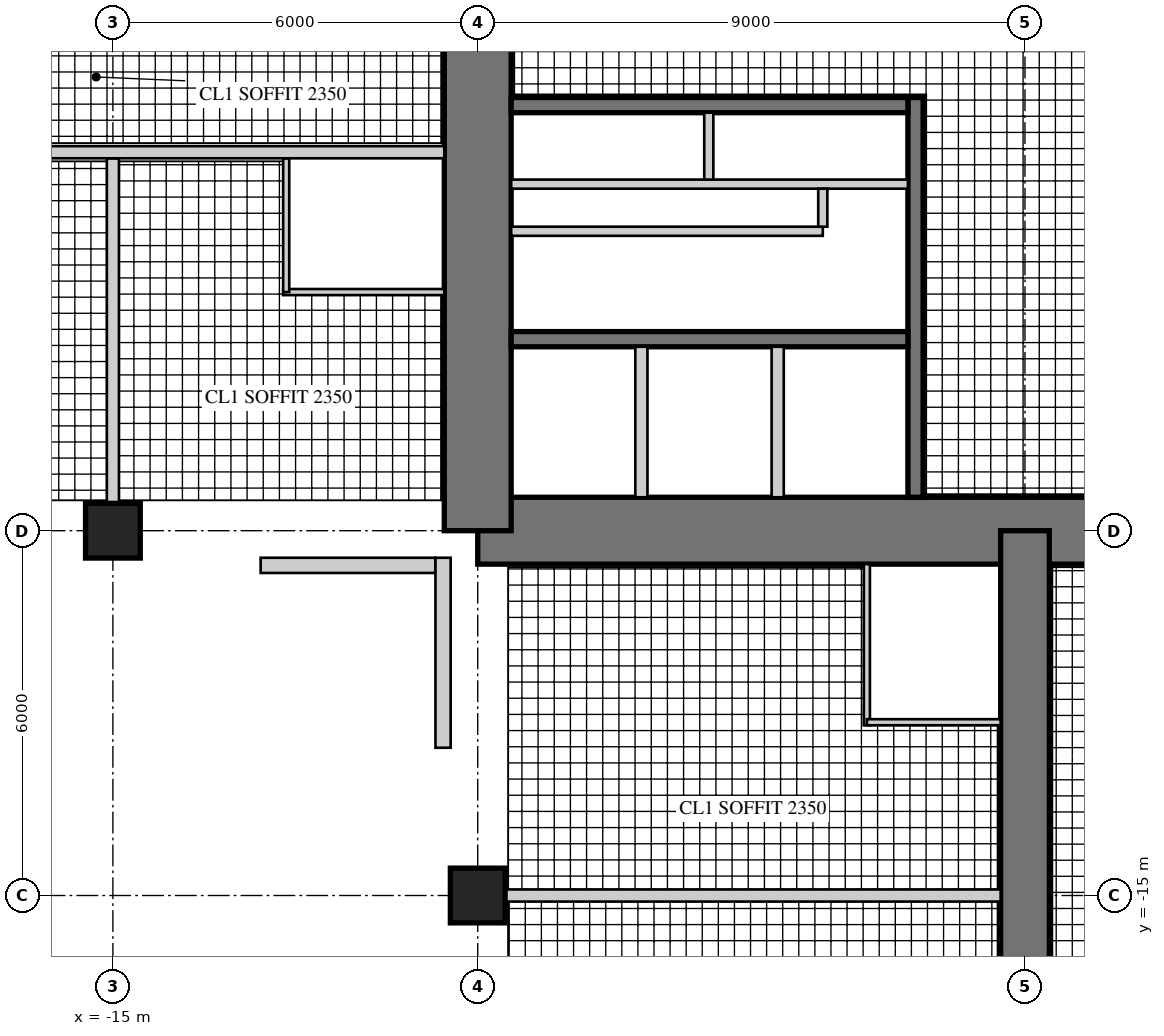
"""IFC4 building model, lengths in metres.
Left out: names, types, materials, properties, quantities, classifications, styles, units other than length and angle.
Written with IfcOpenShell. Run it as: python <this file> out.ifc"""

import sys

from ifc_helpers import new_model, si_unit, direction, frame, frame_2d, origin, origin_2d, place, context, subcontext, project, spatial, rectangle, hollow_rectangle, extrude, element, fill, save


model = new_model("IFC4")
c1 = context("Model", 3, precision=1e-05, world=origin(), true_north=direction((0.0, 1.0)))
c2 = subcontext(c1, "Body", "Model", "MODEL_VIEW")
j1 = project(units=[si_unit("LENGTHUNIT", "METRE"), si_unit("PLANEANGLEUNIT", "RADIAN")], contexts=[c1])
p1 = place(None, origin())
s1 = spatial("IfcSite", under=j1, at=p1, CompositionType="ELEMENT")
p2 = place(p1, origin())
s2 = spatial("IfcBuilding", under=s1, at=p2, CompositionType="ELEMENT")
p3 = place(p2, frame((0.0, 0.0, 189.9)))
s3 = spatial("IfcBuildingStorey", under=s2, at=p3, CompositionType="ELEMENT", Elevation=189.9)
p4 = place(p3, frame((-9.0, -9.0, 0.0), z_axis=(0.0, 0.0, 1.0), x_axis=(1.0, 0.0, 0.0)))
e1 = element("IfcWall", 1, at=p4, inside=s3, PredefinedType="SHEAR", context=c2, shape_type="SweptSolid", body=[
    extrude(rectangle(XDim=18.0, YDim=1.1, at=frame_2d((9.0, 0.0))), origin(), (0.0, 0.0, 1.0), 3.4),
])
p5 = place(p4, frame((9.8, 0.0, 0.0)))
e2 = element("IfcOpeningElement", 2, at=p5, cuts=e1, PredefinedType="OPENING", context=c2, shape_type="SweptSolid", body=[
    extrude(rectangle(XDim=1.0, YDim=2.4, at=frame_2d((0.5, 1.2))), frame((0.0, 0.56, 0.0), z_axis=(0.0, -1.0, 0.0), x_axis=(1.0, 0.0, 0.0)), (0.0, 0.0, 1.0), 1.12),
])
p6 = place(p3, frame((-9.0, 9.0, 0.0), z_axis=(0.0, 0.0, 1.0), x_axis=(0.0, -1.0, 0.0)))
e3 = element("IfcWall", 3, at=p6, inside=s3, PredefinedType="SHEAR", context=c2, shape_type="SweptSolid", body=[
    extrude(rectangle(XDim=18.0, YDim=1.1, at=frame_2d((9.0, 0.0))), origin(), (0.0, 0.0, 1.0), 3.4),
])
p7 = place(p6, frame((9.8, 0.0, 0.0)))
e4 = element("IfcOpeningElement", 4, at=p7, cuts=e3, PredefinedType="OPENING", context=c2, shape_type="SweptSolid", body=[
    extrude(rectangle(XDim=1.0, YDim=2.4, at=frame_2d((0.5, 1.2))), frame((0.0, 0.56, 0.0), z_axis=(0.0, -1.0, 0.0), x_axis=(1.0, 0.0, 0.0)), (0.0, 0.0, 1.0), 1.12),
])
p8 = place(p3, frame((-1.8, -1.875, 0.0), z_axis=(0.0, 0.0, 1.0), x_axis=(0.0, -1.0, 0.0)))
e5 = element("IfcWall", 5, at=p8, inside=s3, PredefinedType="SHEAR", context=c2, shape_type="SweptSolid", body=[
    extrude(rectangle(XDim=6.575, YDim=0.25, at=frame_2d((3.288, 0.0))), origin(), (0.0, 0.0, 1.0), 3.4),
])
p9 = place(p8, frame((1.875, 0.0, 0.0)))
e6 = element("IfcOpeningElement", 6, at=p9, cuts=e5, PredefinedType="OPENING", context=c2, shape_type="SweptSolid", body=[
    extrude(rectangle(XDim=1.6, YDim=2.4, at=frame_2d((0.8, 1.2))), frame((0.0, 0.135, 0.0), z_axis=(0.0, -1.0, 0.0), x_axis=(1.0, 0.0, 0.0)), (0.0, 0.0, 1.0), 0.27),
])
p10 = place(p3, frame((-1.925, -2.0, 0.0), z_axis=(0.0, 0.0, 1.0), x_axis=(-1.0, 0.0, 0.0)))
e7 = element("IfcWall", 7, at=p10, inside=s3, PredefinedType="SHEAR", context=c2, shape_type="SweptSolid", body=[
    extrude(rectangle(XDim=6.525, YDim=0.25, at=frame_2d((3.262, 0.0))), origin(), (0.0, 0.0, 1.0), 3.4),
])
p11 = place(p3, frame((-1.925, -5.85, 0.0), z_axis=(0.0, 0.0, 1.0), x_axis=(-1.0, 0.0, 0.0)))
e8 = element("IfcWall", 8, at=p11, inside=s3, PredefinedType="SHEAR", context=c2, shape_type="SweptSolid", body=[
    extrude(rectangle(XDim=6.525, YDim=0.25, at=frame_2d((3.262, 0.0))), origin(), (0.0, 0.0, 1.0), 3.4),
])
p12 = place(p11, frame((0.471, 0.0, 0.0)))
e9 = element("IfcOpeningElement", 9, at=p12, cuts=e8, PredefinedType="OPENING", context=c2, shape_type="SweptSolid", body=[
    extrude(rectangle(XDim=1.1, YDim=2.2, at=frame_2d((0.55, 1.1))), frame((0.0, 0.135, 0.0), z_axis=(0.0, -1.0, 0.0), x_axis=(1.0, 0.0, 0.0)), (0.0, 0.0, 1.0), 0.27),
])
p13 = place(p11, frame((2.712, 0.0, 0.0)))
e10 = element("IfcOpeningElement", 10, at=p13, cuts=e8, PredefinedType="OPENING", context=c2, shape_type="SweptSolid", body=[
    extrude(rectangle(XDim=1.1, YDim=2.2, at=frame_2d((0.55, 1.1))), frame((0.0, 0.135, 0.0), z_axis=(0.0, -1.0, 0.0), x_axis=(1.0, 0.0, 0.0)), (0.0, 0.0, 1.0), 0.27),
])
p14 = place(p11, frame((4.954, 0.0, 0.0)))
e11 = element("IfcOpeningElement", 11, at=p14, cuts=e8, PredefinedType="OPENING", context=c2, shape_type="SweptSolid", body=[
    extrude(rectangle(XDim=1.1, YDim=2.2, at=frame_2d((0.55, 1.1))), frame((0.0, 0.135, 0.0), z_axis=(0.0, -1.0, 0.0), x_axis=(1.0, 0.0, 0.0)), (0.0, 0.0, 1.0), 0.27),
])
p15 = place(p3, frame((-1.925, -3.3, 0.0), z_axis=(0.0, 0.0, 1.0), x_axis=(-1.0, 0.0, 0.0)))
e12 = element("IfcWall", 12, at=p15, inside=s3, PredefinedType="PARTITIONING", context=c2, shape_type="SweptSolid", body=[
    extrude(rectangle(XDim=6.525, YDim=0.15, at=frame_2d((3.262, 0.0))), origin(), (0.0, 0.0, 1.0), 3.4),
])
p16 = place(p15, frame((0.075, 0.0, 0.0)))
e13 = element("IfcOpeningElement", 13, at=p16, cuts=e12, PredefinedType="OPENING", context=c2, shape_type="SweptSolid", body=[
    extrude(rectangle(XDim=0.8, YDim=2.1, at=frame_2d((0.4, 1.05))), frame((0.0, 0.085, 0.0), z_axis=(0.0, -1.0, 0.0), x_axis=(1.0, 0.0, 0.0)), (0.0, 0.0, 1.0), 0.17),
])
p17 = place(p15, frame((3.675, 0.0, 0.0)))
e14 = element("IfcOpeningElement", 14, at=p17, cuts=e12, PredefinedType="OPENING", context=c2, shape_type="SweptSolid", body=[
    extrude(rectangle(XDim=0.8, YDim=2.1, at=frame_2d((0.4, 1.05))), frame((0.0, 0.085, 0.0), z_axis=(0.0, -1.0, 0.0), x_axis=(1.0, 0.0, 0.0)), (0.0, 0.0, 1.0), 0.17),
])
p18 = place(p3, frame((-5.2, -2.125, 0.0), z_axis=(0.0, 0.0, 1.0), x_axis=(0.0, -1.0, 0.0)))
e15 = element("IfcWall", 15, at=p18, inside=s3, PredefinedType="PARTITIONING", context=c2, shape_type="SweptSolid", body=[
    extrude(rectangle(XDim=1.1, YDim=0.15, at=frame_2d((0.55, 0.0))), origin(), (0.0, 0.0, 1.0), 3.4),
])
for number, where, z_axis, x_axis in (
    (16, (-4.067, -5.975, 0.0), (0.0, 0.0, 1.0), (0.0, -1.0, 0.0)),
    (17, (-6.308, -5.975, 0.0), (0.0, 0.0, 1.0), (0.0, -1.0, 0.0)),
):
    element("IfcWall", number, at=place(p3, frame(where, z_axis=z_axis, x_axis=x_axis)), inside=s3, PredefinedType="PARTITIONING", context=c2, shape_type="SweptSolid", body=[
        extrude(rectangle(XDim=2.475, YDim=0.2, at=frame_2d((1.237, 0.0))), origin(), (0.0, 0.0, 1.0), 3.4),
    ])
p19 = place(p3, frame((0.0, -9.0, 0.0), z_axis=(0.0, 0.0, 1.0), x_axis=(0.0, -1.0, 0.0)))
e18 = element("IfcWall", 18, at=p19, inside=s3, PredefinedType="SHEAR", context=c2, shape_type="SweptSolid", body=[
    extrude(rectangle(XDim=18.0, YDim=0.8, at=frame_2d((9.0, 0.0))), origin(), (0.0, 0.0, 1.0), 3.4),
])
p20 = place(p19, frame((3.95, 0.0, 0.0)))
e19 = element("IfcOpeningElement", 19, at=p20, cuts=e18, PredefinedType="OPENING", context=c2, shape_type="SweptSolid", body=[
    extrude(rectangle(XDim=1.0, YDim=2.15, at=frame_2d((0.5, 1.075))), frame((0.0, 0.41, 0.0), z_axis=(0.0, -1.0, 0.0), x_axis=(1.0, 0.0, 0.0)), (0.0, 0.0, 1.0), 0.82),
])
p21 = place(p19, frame((6.6, 0.0, 0.0)))
e20 = element("IfcOpeningElement", 20, at=p21, cuts=e18, PredefinedType="OPENING", context=c2, shape_type="SweptSolid", body=[
    extrude(rectangle(XDim=1.0, YDim=2.15, at=frame_2d((0.5, 1.075))), frame((0.0, 0.41, 0.0), z_axis=(0.0, -1.0, 0.0), x_axis=(1.0, 0.0, 0.0)), (0.0, 0.0, 1.0), 0.82),
])
p22 = place(p19, frame((13.25, 0.0, 0.0)))
e21 = element("IfcOpeningElement", 21, at=p22, cuts=e18, PredefinedType="OPENING", context=c2, shape_type="SweptSolid", body=[
    extrude(rectangle(XDim=1.0, YDim=2.2, at=frame_2d((0.5, 1.1))), frame((0.0, 0.41, 0.0), z_axis=(0.0, -1.0, 0.0), x_axis=(1.0, 0.0, 0.0)), (0.0, 0.0, 1.0), 0.82),
])
for number, where, z_axis, x_axis in (
    (22, (-9.0, -15.0, 0.0), (0.0, 0.0, 1.0), (1.0, 0.0, 0.0)),
    (23, (-15.0, -9.0, 0.0), (0.0, 0.0, 1.0), (1.0, 0.0, 0.0)),
):
    element("IfcColumn", number, at=place(p3, frame(where, z_axis=z_axis, x_axis=x_axis)), inside=s3, PredefinedType="COLUMN", context=c2, shape_type="SweptSolid", body=[
        extrude(rectangle(XDim=0.9, YDim=0.9, at=origin_2d()), origin(), (0.0, 0.0, 1.0), 3.4),
    ])
p23 = place(p3, frame((-12.57, -9.57, 0.0), z_axis=(0.0, 0.0, 1.0), x_axis=(1.0, 0.0, 0.0)))
e24 = element("IfcWall", 24, at=p23, inside=s3, PredefinedType="SOLIDWALL", context=c2, shape_type="SweptSolid", body=[
    extrude(rectangle(XDim=2.875, YDim=0.25, at=frame_2d((1.438, 0.0))), origin(), (0.0, 0.0, 1.0), 3.22),
])
p24 = place(p23, frame((0.6, 0.0, 0.0)))
e25 = element("IfcOpeningElement", 25, at=p24, cuts=e24, PredefinedType="OPENING", context=c2, shape_type="SweptSolid", body=[
    extrude(rectangle(XDim=1.0, YDim=2.2, at=frame_2d((0.5, 1.1))), frame((0.0, 0.135, 0.0), z_axis=(0.0, -1.0, 0.0), x_axis=(1.0, 0.0, 0.0)), (0.0, 0.0, 1.0), 0.27),
])
p25 = place(p3, frame((-9.57, -9.445, 0.0), z_axis=(0.0, 0.0, 1.0), x_axis=(0.0, -1.0, 0.0)))
e26 = element("IfcWall", 26, at=p25, inside=s3, PredefinedType="SOLIDWALL", context=c2, shape_type="SweptSolid", body=[
    extrude(rectangle(XDim=3.125, YDim=0.25, at=frame_2d((1.562, 0.0))), origin(), (0.0, 0.0, 1.0), 3.22),
])
p26 = place(p25, frame((0.6, 0.0, 0.0)))
e27 = element("IfcOpeningElement", 27, at=p26, cuts=e26, PredefinedType="OPENING", context=c2, shape_type="SweptSolid", body=[
    extrude(rectangle(XDim=1.0, YDim=2.2, at=frame_2d((0.5, 1.1))), frame((0.0, 0.135, 0.0), z_axis=(0.0, -1.0, 0.0), x_axis=(1.0, 0.0, 0.0)), (0.0, 0.0, 1.0), 0.27),
])
p27 = place(p3, frame((-3.325, -4.075, 0.0), z_axis=(0.0, 0.0, 1.0), x_axis=(-1.0, 0.0, 0.0)))
e28 = element("IfcWall", 28, at=p27, inside=s3, PredefinedType="PARTITIONING", context=c2, shape_type="SweptSolid", body=[
    extrude(rectangle(XDim=5.125, YDim=0.15, at=frame_2d((2.562, 0.0))), origin(), (0.0, 0.0, 1.0), 3.22),
])
p28 = place(p27, frame((2.062, 0.0, 0.0)))
e29 = element("IfcOpeningElement", 29, at=p28, cuts=e28, PredefinedType="OPENING", context=c2, shape_type="SweptSolid", body=[
    extrude(rectangle(XDim=1.0, YDim=2.1, at=frame_2d((0.5, 1.05))), frame((0.0, 0.085, 0.0), z_axis=(0.0, -1.0, 0.0), x_axis=(1.0, 0.0, 0.0)), (0.0, 0.0, 1.0), 0.17),
])
p29 = place(p3, frame((-3.325, -3.375, 0.0), z_axis=(0.0, 0.0, 1.0), x_axis=(0.0, -1.0, 0.0)))
e30 = element("IfcWall", 30, at=p29, inside=s3, PredefinedType="PARTITIONING", context=c2, shape_type="SweptSolid", body=[
    extrude(rectangle(XDim=0.625, YDim=0.15, at=frame_2d((0.312, 0.0))), origin(), (0.0, 0.0, 1.0), 3.22),
])
p30 = place(p3, frame((-2.6, -9.55, 0.0), z_axis=(0.0, 0.0, 1.0), x_axis=(0.0, -1.0, 0.0)))
e31 = element("IfcWall", 31, at=p30, inside=s3, PredefinedType="PARTITIONING", context=c2, shape_type="SweptSolid", body=[
    extrude(rectangle(XDim=2.65, YDim=0.1, at=frame_2d((1.325, 0.0))), origin(), (0.0, 0.0, 1.0), 3.22),
])
p31 = place(p3, frame((-2.6, -12.15, 0.0), z_axis=(0.0, 0.0, 1.0), x_axis=(1.0, 0.0, 0.0)))
e32 = element("IfcWall", 32, at=p31, inside=s3, PredefinedType="PARTITIONING", context=c2, shape_type="SweptSolid", body=[
    extrude(rectangle(XDim=2.2, YDim=0.1, at=frame_2d((1.1, 0.0))), origin(), (0.0, 0.0, 1.0), 3.22),
])
p32 = place(p31, frame((0.55, 0.0, 0.0)))
e33 = element("IfcOpeningElement", 33, at=p32, cuts=e32, PredefinedType="OPENING", context=c2, shape_type="SweptSolid", body=[
    extrude(rectangle(XDim=0.9, YDim=2.1, at=frame_2d((0.45, 1.05))), frame((0.0, 0.06, 0.0), z_axis=(0.0, -1.0, 0.0), x_axis=(1.0, 0.0, 0.0)), (0.0, 0.0, 1.0), 0.12),
])
p33 = place(p3, frame((-8.55, -15.0, 0.0), z_axis=(0.0, 0.0, 1.0), x_axis=(1.0, 0.0, 0.0)))
e34 = element("IfcWall", 34, at=p33, inside=s3, PredefinedType="SOLIDWALL", context=c2, shape_type="SweptSolid", body=[
    extrude(rectangle(XDim=8.15, YDim=0.2, at=frame_2d((4.075, 0.0))), origin(), (0.0, 0.0, 1.0), 2.47),
])
p34 = place(p3, frame((-9.55, -5.075, 0.0), z_axis=(0.0, 0.0, 1.0), x_axis=(-1.0, 0.0, 0.0)))
e35 = element("IfcWall", 35, at=p34, inside=s3, PredefinedType="PARTITIONING", context=c2, shape_type="SweptSolid", body=[
    extrude(rectangle(XDim=2.65, YDim=0.1, at=frame_2d((1.325, 0.0))), origin(), (0.0, 0.0, 1.0), 3.22),
])
p35 = place(p3, frame((-12.15, -2.875, 0.0), z_axis=(0.0, 0.0, 1.0), x_axis=(0.0, -1.0, 0.0)))
e36 = element("IfcWall", 36, at=p35, inside=s3, PredefinedType="PARTITIONING", context=c2, shape_type="SweptSolid", body=[
    extrude(rectangle(XDim=2.2, YDim=0.1, at=frame_2d((1.1, 0.0))), origin(), (0.0, 0.0, 1.0), 3.22),
])
p36 = place(p35, frame((0.55, 0.0, 0.0)))
e37 = element("IfcOpeningElement", 37, at=p36, cuts=e36, PredefinedType="OPENING", context=c2, shape_type="SweptSolid", body=[
    extrude(rectangle(XDim=0.9, YDim=2.1, at=frame_2d((0.45, 1.05))), frame((0.0, 0.06, 0.0), z_axis=(0.0, -1.0, 0.0), x_axis=(1.0, 0.0, 0.0)), (0.0, 0.0, 1.0), 0.12),
])
p37 = place(p3, frame((-15.0, -2.875, 0.0), z_axis=(0.0, 0.0, 1.0), x_axis=(0.0, -1.0, 0.0)))
e38 = element("IfcWall", 38, at=p37, inside=s3, PredefinedType="SOLIDWALL", context=c2, shape_type="SweptSolid", body=[
    extrude(rectangle(XDim=5.675, YDim=0.2, at=frame_2d((2.837, 0.0))), origin(), (0.0, 0.0, 1.0), 2.47),
])
p38 = place(p3, frame((-9.55, -2.775, 0.0), z_axis=(0.0, 0.0, 1.0), x_axis=(-1.0, 0.0, 0.0)))
e39 = element("IfcWall", 39, at=p38, inside=s3, PredefinedType="SOLIDWALL", context=c2, shape_type="SweptSolid", body=[
    extrude(rectangle(XDim=11.45, YDim=0.2, at=frame_2d((5.725, 0.0))), origin(), (0.0, 0.0, 1.0), 3.22),
])
p39 = place(p38, frame((3.4, 0.0, 0.0)))
e40 = element("IfcOpeningElement", 40, at=p39, cuts=e39, PredefinedType="OPENING", context=c2, shape_type="SweptSolid", body=[
    extrude(rectangle(XDim=1.0, YDim=2.15, at=frame_2d((0.5, 1.075))), frame((0.0, 0.11, 0.0), z_axis=(0.0, -1.0, 0.0), x_axis=(1.0, 0.0, 0.0)), (0.0, 0.0, 1.0), 0.22),
])
p40 = place(p38, frame((6.05, 0.0, 0.0)))
e41 = element("IfcOpeningElement", 41, at=p40, cuts=e39, PredefinedType="OPENING", context=c2, shape_type="SweptSolid", body=[
    extrude(rectangle(XDim=1.0, YDim=2.15, at=frame_2d((0.5, 1.075))), frame((0.0, 0.11, 0.0), z_axis=(0.0, -1.0, 0.0), x_axis=(1.0, 0.0, 0.0)), (0.0, 0.0, 1.0), 0.22),
])
p41 = place(p24, origin())
e42 = element("IfcDoor", 42, at=p41, inside=s3, OperationType="SINGLE_SWING_RIGHT", PredefinedType="DOOR", context=c2, shape_type="SweptSolid", body=[
    extrude(hollow_rectangle(XDim=1.0, YDim=2.2, WallThickness=0.06, at=frame_2d((0.5, 1.1))), frame((0.0, 0.025, 0.0), z_axis=(0.0, -1.0, 0.0), x_axis=(1.0, 0.0, 0.0)), (0.0, 0.0, 1.0), 0.05),
    extrude(rectangle(XDim=0.879, YDim=2.079, at=frame_2d((0.5, 1.1))), frame((0.0, 0.025, 0.0), z_axis=(0.0, -1.0, 0.0), x_axis=(1.0, 0.0, 0.0)), (0.0, 0.0, 1.0), 0.05),
])
fill(e25, e42)
p42 = place(p26, origin())
e43 = element("IfcDoor", 43, at=p42, inside=s3, OperationType="SINGLE_SWING_LEFT", PredefinedType="DOOR", context=c2, shape_type="SweptSolid", body=[
    extrude(hollow_rectangle(XDim=1.0, YDim=2.2, WallThickness=0.06, at=frame_2d((0.5, 1.1))), frame((0.0, 0.025, 0.0), z_axis=(0.0, -1.0, 0.0), x_axis=(1.0, 0.0, 0.0)), (0.0, 0.0, 1.0), 0.05),
    extrude(rectangle(XDim=0.879, YDim=2.079, at=frame_2d((0.5, 1.1))), frame((0.0, 0.025, 0.0), z_axis=(0.0, -1.0, 0.0), x_axis=(1.0, 0.0, 0.0)), (0.0, 0.0, 1.0), 0.05),
])
fill(e27, e43)
p43 = place(p28, frame((1.0, 0.0, 0.0), z_axis=(0.0, 0.0, 1.0), x_axis=(-1.0, 0.0, 0.0)))
e44 = element("IfcDoor", 44, at=p43, inside=s3, OperationType="DOUBLE_DOOR_SINGLE_SWING", PredefinedType="DOOR", context=c2, shape_type="SweptSolid", body=[
    extrude(rectangle(XDim=1.0, YDim=2.1, at=frame_2d((0.5, 1.05))), frame((0.0, 0.025, 0.0), z_axis=(0.0, -1.0, 0.0), x_axis=(1.0, 0.0, 0.0)), (0.0, 0.0, 1.0), 0.05),
])
fill(e29, e44)
p44 = place(p32, origin())
e45 = element("IfcDoor", 45, at=p44, inside=s3, OperationType="SINGLE_SWING_LEFT", PredefinedType="DOOR", context=c2, shape_type="SweptSolid", body=[
    extrude(rectangle(XDim=0.9, YDim=2.1, at=frame_2d((0.45, 1.05))), frame((0.0, 0.025, 0.0), z_axis=(0.0, -1.0, 0.0), x_axis=(1.0, 0.0, 0.0)), (0.0, 0.0, 1.0), 0.05),
])
fill(e33, e45)
p45 = place(p36, origin())
e46 = element("IfcDoor", 46, at=p45, inside=s3, OperationType="SINGLE_SWING_LEFT", PredefinedType="DOOR", context=c2, shape_type="SweptSolid", body=[
    extrude(rectangle(XDim=0.9, YDim=2.1, at=frame_2d((0.45, 1.05))), frame((0.0, 0.025, 0.0), z_axis=(0.0, -1.0, 0.0), x_axis=(1.0, 0.0, 0.0)), (0.0, 0.0, 1.0), 0.05),
])
fill(e37, e46)
p46 = place(p39, origin())
e47 = element("IfcDoor", 47, at=p46, inside=s3, OperationType="SINGLE_SWING_LEFT", PredefinedType="DOOR", context=c2, shape_type="SweptSolid", body=[
    extrude(rectangle(XDim=1.0, YDim=2.15, at=frame_2d((0.5, 1.075))), frame((0.0, 0.025, 0.0), z_axis=(0.0, -1.0, 0.0), x_axis=(1.0, 0.0, 0.0)), (0.0, 0.0, 1.0), 0.05),
])
fill(e40, e47)
p47 = place(p40, origin())
e48 = element("IfcDoor", 48, at=p47, inside=s3, OperationType="SINGLE_SWING_LEFT", PredefinedType="DOOR", context=c2, shape_type="SweptSolid", body=[
    extrude(rectangle(XDim=1.0, YDim=2.15, at=frame_2d((0.5, 1.075))), frame((0.0, 0.025, 0.0), z_axis=(0.0, -1.0, 0.0), x_axis=(1.0, 0.0, 0.0)), (0.0, 0.0, 1.0), 0.05),
])
fill(e41, e48)
p48 = place(p20, frame((1.0, 0.0, 0.0), z_axis=(0.0, 0.0, 1.0), x_axis=(-1.0, 0.0, 0.0)))
e49 = element("IfcDoor", 49, at=p48, inside=s3, OperationType="SINGLE_SWING_RIGHT", PredefinedType="DOOR", context=c2, shape_type="SweptSolid", body=[
    extrude(rectangle(XDim=1.0, YDim=2.15, at=frame_2d((0.5, 1.075))), frame((0.0, 0.025, 0.0), z_axis=(0.0, -1.0, 0.0), x_axis=(1.0, 0.0, 0.0)), (0.0, 0.0, 1.0), 0.05),
])
fill(e19, e49)
p49 = place(p21, frame((1.0, 0.0, 0.0), z_axis=(0.0, 0.0, 1.0), x_axis=(-1.0, 0.0, 0.0)))
e50 = element("IfcDoor", 50, at=p49, inside=s3, OperationType="SINGLE_SWING_RIGHT", PredefinedType="DOOR", context=c2, shape_type="SweptSolid", body=[
    extrude(rectangle(XDim=1.0, YDim=2.15, at=frame_2d((0.5, 1.075))), frame((0.0, 0.025, 0.0), z_axis=(0.0, -1.0, 0.0), x_axis=(1.0, 0.0, 0.0)), (0.0, 0.0, 1.0), 0.05),
])
fill(e20, e50)
p50 = place(p5, origin())
e51 = element("IfcDoor", 51, at=p50, inside=s3, OperationType="SINGLE_SWING_RIGHT", PredefinedType="DOOR", context=c2, shape_type="SweptSolid", body=[
    extrude(rectangle(XDim=1.0, YDim=2.4, at=frame_2d((0.5, 1.2))), frame((0.0, 0.055, 0.0), z_axis=(0.0, -1.0, 0.0), x_axis=(1.0, 0.0, 0.0)), (0.0, 0.0, 1.0), 0.05),
])
fill(e2, e51)
p51 = place(p7, origin())
e52 = element("IfcDoor", 52, at=p51, inside=s3, OperationType="SINGLE_SWING_RIGHT", PredefinedType="DOOR", context=c2, shape_type="SweptSolid", body=[
    extrude(rectangle(XDim=1.0, YDim=2.4, at=frame_2d((0.5, 1.2))), frame((0.0, 0.055, 0.0), z_axis=(0.0, -1.0, 0.0), x_axis=(1.0, 0.0, 0.0)), (0.0, 0.0, 1.0), 0.05),
])
fill(e4, e52)
p52 = place(p12, origin())
e53 = element("IfcDoor", 53, at=p52, inside=s3, OperationType="DOUBLE_DOOR_SLIDING", PredefinedType="DOOR", context=c2, shape_type="SweptSolid", body=[
    extrude(rectangle(XDim=1.1, YDim=2.2, at=frame_2d((0.55, 1.1))), frame((0.0, 0.025, 0.0), z_axis=(0.0, -1.0, 0.0), x_axis=(1.0, 0.0, 0.0)), (0.0, 0.0, 1.0), 0.05),
])
fill(e9, e53)
p53 = place(p13, origin())
e54 = element("IfcDoor", 54, at=p53, inside=s3, OperationType="DOUBLE_DOOR_SLIDING", PredefinedType="DOOR", context=c2, shape_type="SweptSolid", body=[
    extrude(rectangle(XDim=1.1, YDim=2.2, at=frame_2d((0.55, 1.1))), frame((0.0, 0.025, 0.0), z_axis=(0.0, -1.0, 0.0), x_axis=(1.0, 0.0, 0.0)), (0.0, 0.0, 1.0), 0.05),
])
fill(e10, e54)
p54 = place(p14, origin())
e55 = element("IfcDoor", 55, at=p54, inside=s3, OperationType="DOUBLE_DOOR_SLIDING", PredefinedType="DOOR", context=c2, shape_type="SweptSolid", body=[
    extrude(rectangle(XDim=1.1, YDim=2.2, at=frame_2d((0.55, 1.1))), frame((0.0, 0.025, 0.0), z_axis=(0.0, -1.0, 0.0), x_axis=(1.0, 0.0, 0.0)), (0.0, 0.0, 1.0), 0.05),
])
fill(e11, e55)
p55 = place(p9, origin())
e56 = element("IfcDoor", 56, at=p55, inside=s3, OperationType="DOUBLE_DOOR_DOUBLE_SWING", PredefinedType="DOOR", context=c2, shape_type="SweptSolid", body=[
    extrude(rectangle(XDim=1.6, YDim=2.4, at=frame_2d((0.8, 1.2))), frame((0.0, 0.025, 0.0), z_axis=(0.0, -1.0, 0.0), x_axis=(1.0, 0.0, 0.0)), (0.0, 0.0, 1.0), 0.05),
])
fill(e6, e56)
p56 = place(p16, frame((0.8, 0.0, 0.0), z_axis=(0.0, 0.0, 1.0), x_axis=(-1.0, 0.0, 0.0)))
e57 = element("IfcDoor", 57, at=p56, inside=s3, OperationType="SINGLE_SWING_RIGHT", PredefinedType="DOOR", context=c2, shape_type="SweptSolid", body=[
    extrude(rectangle(XDim=0.8, YDim=2.1, at=frame_2d((0.4, 1.05))), frame((0.0, 0.025, 0.0), z_axis=(0.0, -1.0, 0.0), x_axis=(1.0, 0.0, 0.0)), (0.0, 0.0, 1.0), 0.05),
])
fill(e13, e57)
p57 = place(p17, frame((0.8, 0.0, 0.0), z_axis=(0.0, 0.0, 1.0), x_axis=(-1.0, 0.0, 0.0)))
e58 = element("IfcDoor", 58, at=p57, inside=s3, OperationType="SINGLE_SWING_RIGHT", PredefinedType="DOOR", context=c2, shape_type="SweptSolid", body=[
    extrude(rectangle(XDim=0.8, YDim=2.1, at=frame_2d((0.4, 1.05))), frame((0.0, 0.025, 0.0), z_axis=(0.0, -1.0, 0.0), x_axis=(1.0, 0.0, 0.0)), (0.0, 0.0, 1.0), 0.05),
])
fill(e14, e58)
save(model, sys.argv[1])
